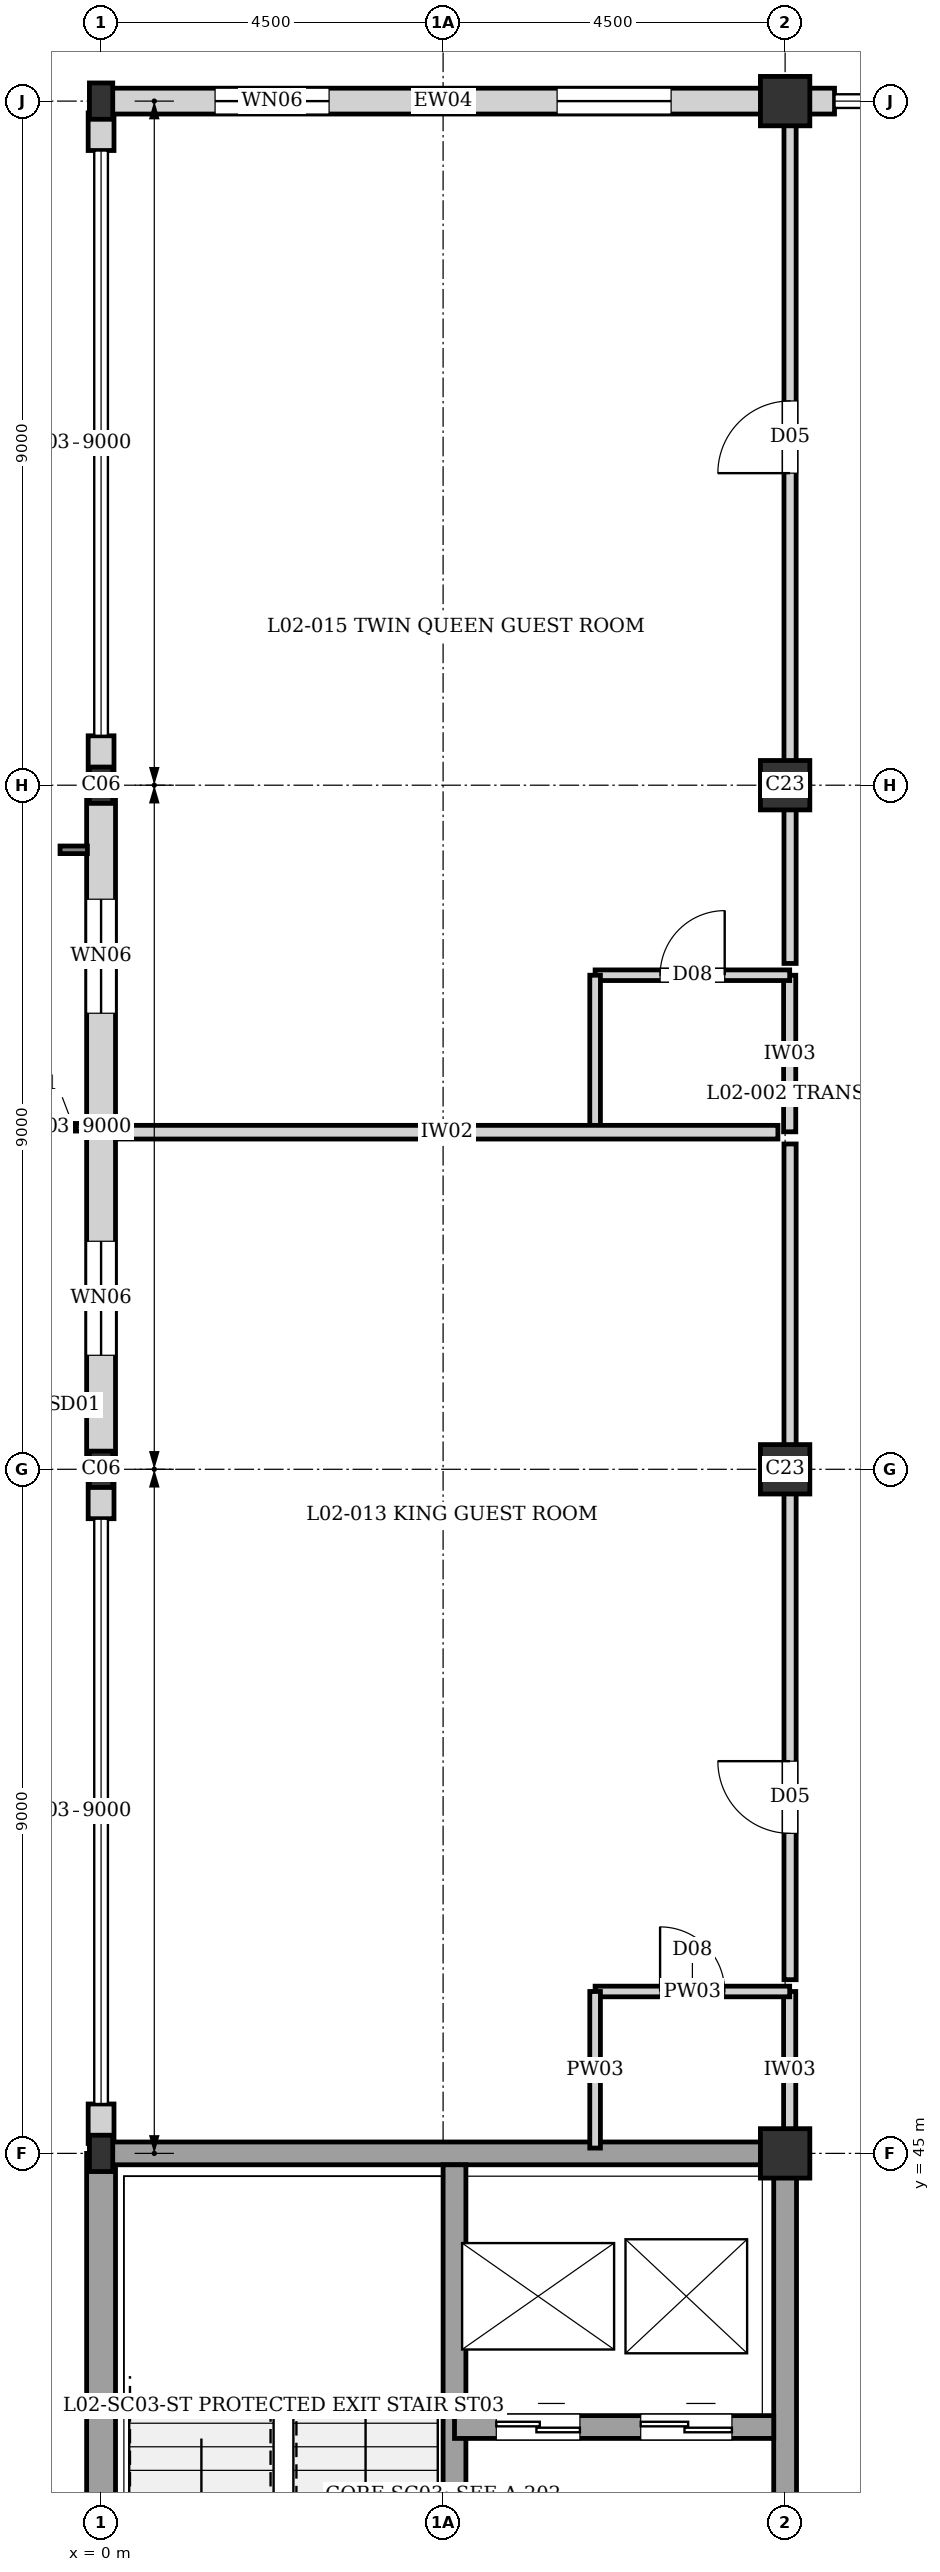
"""IFC4 building model, lengths in metres.
Left out: names, types, materials, properties, quantities, classifications, styles, units other than length and angle.
Written with IfcOpenShell. Run it as: python <this file> out.ifc"""

import sys

from ifc_helpers import new_model, si_unit, direction, frame, frame_2d, origin, origin_2d, place, context, subcontext, project, spatial, rectangle, i_section, extrude, element, fill, save


model = new_model("IFC4")
c1 = context("Model", 3, precision=1e-05, world=origin(), true_north=direction((0.0, 1.0)))
c2 = subcontext(c1, "Body", "Model", "MODEL_VIEW")
j1 = project(units=[si_unit("LENGTHUNIT", "METRE"), si_unit("PLANEANGLEUNIT", "RADIAN")], contexts=[c1])
p1 = place(None, origin())
s1 = spatial("IfcSite", under=j1, at=p1, CompositionType="ELEMENT")
p2 = place(p1, origin())
s2 = spatial("IfcBuilding", under=s1, at=p2, CompositionType="ELEMENT")
p3 = place(p2, frame((0.0, 0.0, 8.16)))
s3 = spatial("IfcBuildingStorey", under=s2, at=p3, CompositionType="ELEMENT", Elevation=8.16)
for number, where, z_axis, x_axis in (
    (1, (0.0, 45.0, 0.0), (0.0, 0.0, 1.0), (1.0, 0.0, 0.0)),
    (2, (0.0, 54.0, 0.0), (0.0, 0.0, 1.0), (1.0, 0.0, 0.0)),
    (3, (0.0, 63.0, 0.0), (0.0, 0.0, 1.0), (1.0, 0.0, 0.0)),
    (4, (0.0, 72.0, 0.0), (0.0, 0.0, 1.0), (1.0, 0.0, 0.0)),
):
    element("IfcColumn", number, at=place(p3, frame(where, z_axis=z_axis, x_axis=x_axis)), inside=s3, PredefinedType="COLUMN", context=c2, shape_type="SweptSolid", body=[
        extrude(i_section(OverallWidth=0.307, OverallDepth=0.478, WebThickness=0.021, FlangeThickness=0.04, at=origin_2d()), origin(), (0.0, 0.0, 1.0), 3.36),
    ])
for number, where, z_axis, x_axis in (
    (5, (9.0, 45.0, 0.0), (0.0, 0.0, 1.0), (1.0, 0.0, 0.0)),
    (6, (9.0, 54.0, 0.0), (0.0, 0.0, 1.0), (1.0, 0.0, 0.0)),
    (7, (9.0, 63.0, 0.0), (0.0, 0.0, 1.0), (1.0, 0.0, 0.0)),
    (8, (9.0, 72.0, 0.0), (0.0, 0.0, 1.0), (1.0, 0.0, 0.0)),
):
    element("IfcColumn", number, at=place(p3, frame(where, z_axis=z_axis, x_axis=x_axis)), inside=s3, PredefinedType="COLUMN", context=c2, shape_type="SweptSolid", body=[
        extrude(rectangle(XDim=0.65, YDim=0.65, at=origin_2d()), origin(), (0.0, 0.0, 1.0), 3.36),
    ])
p4 = place(p3, frame((0.0, 36.0, 0.0), z_axis=(0.0, 0.0, 1.0), x_axis=(0.0, 1.0, 0.0)))
e9 = element("IfcWall", 9, at=p4, inside=s3, PredefinedType="SOLIDWALL", context=c2, shape_type="SweptSolid", body=[
    extrude(rectangle(XDim=9.0, YDim=0.38, at=frame_2d((4.5, 0.0))), origin(), (0.0, 0.0, 1.0), 3.14),
])
p5 = place(p3, frame((0.0, 45.13, 0.0), z_axis=(0.0, 0.0, 1.0), x_axis=(0.0, 1.0, 0.0)))
e10 = element("IfcWall", 10, at=p5, inside=s3, PredefinedType="SOLIDWALL", context=c2, shape_type="SweptSolid", body=[
    extrude(rectangle(XDim=0.52, YDim=0.34, at=frame_2d((0.26, 0.0))), origin(), (0.0, 0.0, 1.0), 2.74),
])
p6 = place(p3, frame((0.0, 53.35, 0.0), z_axis=(0.0, 0.0, 1.0), x_axis=(0.0, 1.0, 0.0)))
e11 = element("IfcWall", 11, at=p6, inside=s3, PredefinedType="SOLIDWALL", context=c2, shape_type="SweptSolid", body=[
    extrude(rectangle(XDim=0.65, YDim=0.34, at=frame_2d((0.325, 0.0))), origin(), (0.0, 0.0, 1.0), 2.74),
])
p7 = place(p3, frame((0.0, 54.0, 0.0), z_axis=(0.0, 0.0, 1.0), x_axis=(0.0, 1.0, 0.0)))
e12 = element("IfcWall", 12, at=p7, inside=s3, PredefinedType="SOLIDWALL", context=c2, shape_type="SweptSolid", body=[
    extrude(rectangle(XDim=9.0, YDim=0.38, at=frame_2d((4.5, 0.0))), origin(), (0.0, 0.0, 1.0), 2.7),
])
p8 = place(p7, frame((1.5, 0.0, 0.35)))
e13 = element("IfcOpeningElement", 13, at=p8, cuts=e12, PredefinedType="OPENING", context=c2, shape_type="SweptSolid", body=[
    extrude(rectangle(XDim=1.5, YDim=1.8, at=frame_2d((0.75, 0.9))), frame((0.0, 0.2, 0.0), z_axis=(0.0, -1.0, 0.0), x_axis=(1.0, 0.0, 0.0)), (0.0, 0.0, 1.0), 0.4),
])
p9 = place(p7, frame((6.0, 0.0, 0.35)))
e14 = element("IfcOpeningElement", 14, at=p9, cuts=e12, PredefinedType="OPENING", context=c2, shape_type="SweptSolid", body=[
    extrude(rectangle(XDim=1.5, YDim=1.8, at=frame_2d((0.75, 0.9))), frame((0.0, 0.2, 0.0), z_axis=(0.0, -1.0, 0.0), x_axis=(1.0, 0.0, 0.0)), (0.0, 0.0, 1.0), 0.4),
])
p10 = place(p3, frame((0.0, 63.0, 0.0), z_axis=(0.0, 0.0, 1.0), x_axis=(0.0, 1.0, 0.0)))
e15 = element("IfcWall", 15, at=p10, inside=s3, PredefinedType="SOLIDWALL", context=c2, shape_type="SweptSolid", body=[
    extrude(rectangle(XDim=0.65, YDim=0.34, at=frame_2d((0.325, 0.0))), origin(), (0.0, 0.0, 1.0), 3.14),
])
p11 = place(p3, frame((0.0, 71.35, 0.0), z_axis=(0.0, 0.0, 1.0), x_axis=(0.0, 1.0, 0.0)))
e16 = element("IfcWall", 16, at=p11, inside=s3, PredefinedType="SOLIDWALL", context=c2, shape_type="SweptSolid", body=[
    extrude(rectangle(XDim=0.495, YDim=0.34, at=frame_2d((0.248, 0.0))), origin(), (0.0, 0.0, 1.0), 3.14),
])
p12 = place(p3, frame((0.0, 72.0, 0.0), z_axis=(0.0, 0.0, 1.0), x_axis=(1.0, 0.0, 0.0)))
e17 = element("IfcWall", 17, at=p12, inside=s3, PredefinedType="SOLIDWALL", context=c2, shape_type="SweptSolid", body=[
    extrude(rectangle(XDim=9.0, YDim=0.34, at=frame_2d((4.5, 0.0))), origin(), (0.0, 0.0, 1.0), 2.87),
])
p13 = place(p12, frame((1.5, 0.0, 0.35)))
e18 = element("IfcOpeningElement", 18, at=p13, cuts=e17, PredefinedType="OPENING", context=c2, shape_type="SweptSolid", body=[
    extrude(rectangle(XDim=1.5, YDim=1.8, at=frame_2d((0.75, 0.9))), frame((0.0, 0.18, 0.0), z_axis=(0.0, -1.0, 0.0), x_axis=(1.0, 0.0, 0.0)), (0.0, 0.0, 1.0), 0.36),
])
p14 = place(p12, frame((6.0, 0.0, 0.35)))
e19 = element("IfcOpeningElement", 19, at=p14, cuts=e17, PredefinedType="OPENING", context=c2, shape_type="SweptSolid", body=[
    extrude(rectangle(XDim=1.5, YDim=1.8, at=frame_2d((0.75, 0.9))), frame((0.0, 0.18, 0.0), z_axis=(0.0, -1.0, 0.0), x_axis=(1.0, 0.0, 0.0)), (0.0, 0.0, 1.0), 0.36),
])
p15 = place(p3, frame((9.0, 72.0, 0.0), z_axis=(0.0, 0.0, 1.0), x_axis=(1.0, 0.0, 0.0)))
e20 = element("IfcWall", 20, at=p15, inside=s3, PredefinedType="SOLIDWALL", context=c2, shape_type="SweptSolid", body=[
    extrude(rectangle(XDim=0.65, YDim=0.34, at=frame_2d((0.325, 0.0))), origin(), (0.0, 0.0, 1.0), 2.8),
])
p16 = place(p3, frame((9.0, 36.0, 0.0), z_axis=(0.0, 0.0, 1.0), x_axis=(0.0, 1.0, 0.0)))
e21 = element("IfcWall", 21, at=p16, inside=s3, PredefinedType="SHEAR", context=c2, shape_type="SweptSolid", body=[
    extrude(rectangle(XDim=9.0, YDim=0.3, at=frame_2d((4.5, 0.0))), origin(), (0.0, 0.0, 1.0), 3.14),
])
p17 = place(p16, frame((1.95, 0.0, 0.0)))
e22 = element("IfcOpeningElement", 22, at=p17, cuts=e21, PredefinedType="OPENING", context=c2, shape_type="SweptSolid", body=[
    extrude(rectangle(XDim=1.6, YDim=2.1, at=frame_2d((0.8, 1.05))), frame((0.0, 0.16, 0.0), z_axis=(0.0, -1.0, 0.0), x_axis=(1.0, 0.0, 0.0)), (0.0, 0.0, 1.0), 0.32),
])
p18 = place(p3, frame((0.0, 45.0, 0.0), z_axis=(0.0, 0.0, 1.0), x_axis=(1.0, 0.0, 0.0)))
e23 = element("IfcWall", 23, at=p18, inside=s3, PredefinedType="SHEAR", context=c2, shape_type="SweptSolid", body=[
    extrude(rectangle(XDim=9.0, YDim=0.3, at=frame_2d((4.5, 0.0))), origin(), (0.0, 0.0, 1.0), 3.14),
])
p19 = place(p3, frame((4.65, 36.15, 0.0), z_axis=(0.0, 0.0, 1.0), x_axis=(0.0, 1.0, 0.0)))
e24 = element("IfcWall", 24, at=p19, inside=s3, PredefinedType="SHEAR", context=c2, shape_type="SweptSolid", body=[
    extrude(rectangle(XDim=8.7, YDim=0.3, at=frame_2d((4.35, 0.0))), origin(), (0.0, 0.0, 1.0), 3.14),
])
p20 = place(p19, frame((0.35, 0.0, 0.0)))
e25 = element("IfcOpeningElement", 25, at=p20, cuts=e24, PredefinedType="OPENING", context=c2, shape_type="SweptSolid", body=[
    extrude(rectangle(XDim=1.4, YDim=2.02, at=frame_2d((0.7, 1.01))), frame((0.0, 0.16, 0.0), z_axis=(0.0, -1.0, 0.0), x_axis=(1.0, 0.0, 0.0)), (0.0, 0.0, 1.0), 0.32),
])
p21 = place(p3, frame((4.65, 41.4, 0.0), z_axis=(0.0, 0.0, 1.0), x_axis=(1.0, 0.0, 0.0)))
e26 = element("IfcWall", 26, at=p21, inside=s3, PredefinedType="SHEAR", context=c2, shape_type="SweptSolid", body=[
    extrude(rectangle(XDim=4.2, YDim=0.3, at=frame_2d((2.1, 0.0))), origin(), (0.0, 0.0, 1.0), 3.14),
])
p22 = place(p21, frame((0.55, 0.0, 0.0)))
e27 = element("IfcOpeningElement", 27, at=p22, cuts=e26, PredefinedType="OPENING", context=c2, shape_type="SweptSolid", body=[
    extrude(rectangle(XDim=1.1, YDim=2.1, at=frame_2d((0.55, 1.05))), frame((0.0, 0.16, 0.0), z_axis=(0.0, -1.0, 0.0), x_axis=(1.0, 0.0, 0.0)), (0.0, 0.0, 1.0), 0.32),
])
p23 = place(p21, frame((2.45, 0.0, 0.0)))
e28 = element("IfcOpeningElement", 28, at=p23, cuts=e26, PredefinedType="OPENING", context=c2, shape_type="SweptSolid", body=[
    extrude(rectangle(XDim=1.2, YDim=2.2, at=frame_2d((0.6, 1.1))), frame((0.0, 0.16, 0.0), z_axis=(0.0, -1.0, 0.0), x_axis=(1.0, 0.0, 0.0)), (0.0, 0.0, 1.0), 0.32),
])
p24 = place(p3, frame((9.06, 45.07, 0.0), z_axis=(0.0, 0.0, 1.0), x_axis=(0.0, 1.0, 0.0)))
e29 = element("IfcWall", 29, at=p24, inside=s3, PredefinedType="PARTITIONING", context=c2, shape_type="SweptSolid", body=[
    extrude(rectangle(XDim=2.06, YDim=0.16, at=frame_2d((1.03, 0.0))), origin(), (0.0, 0.0, 1.0), 2.66),
])
p25 = place(p3, frame((6.5, 47.13, 0.0), z_axis=(0.0, 0.0, 1.0), x_axis=(1.0, 0.0, 0.0)))
e30 = element("IfcWall", 30, at=p25, inside=s3, PredefinedType="PLUMBINGWALL", context=c2, shape_type="SweptSolid", body=[
    extrude(rectangle(XDim=2.56, YDim=0.14, at=frame_2d((1.28, 0.0))), origin(), (0.0, 0.0, 1.0), 3.14),
])
p26 = place(p25, frame((0.855, 0.0, 0.0)))
e31 = element("IfcOpeningElement", 31, at=p26, cuts=e30, PredefinedType="OPENING", context=c2, shape_type="SweptSolid", body=[
    extrude(rectangle(XDim=0.85, YDim=2.04, at=frame_2d((0.425, 1.02))), frame((0.0, 0.08, 0.0), z_axis=(0.0, -1.0, 0.0), x_axis=(1.0, 0.0, 0.0)), (0.0, 0.0, 1.0), 0.16),
])
p27 = place(p3, frame((6.5, 45.07, 0.0), z_axis=(0.0, 0.0, 1.0), x_axis=(0.0, 1.0, 0.0)))
e32 = element("IfcWall", 32, at=p27, inside=s3, PredefinedType="PLUMBINGWALL", context=c2, shape_type="SweptSolid", body=[
    extrude(rectangle(XDim=2.06, YDim=0.14, at=frame_2d((1.03, 0.0))), origin(), (0.0, 0.0, 1.0), 3.14),
])
p28 = place(p3, frame((9.06, 58.44, 0.0), z_axis=(0.0, 0.0, 1.0), x_axis=(0.0, 1.0, 0.0)))
e33 = element("IfcWall", 33, at=p28, inside=s3, PredefinedType="PARTITIONING", context=c2, shape_type="SweptSolid", body=[
    extrude(rectangle(XDim=2.06, YDim=0.16, at=frame_2d((1.03, 0.0))), origin(), (0.0, 0.0, 1.0), 2.61),
])
p29 = place(p3, frame((6.5, 60.5, 0.0), z_axis=(0.0, 0.0, 1.0), x_axis=(1.0, 0.0, 0.0)))
e34 = element("IfcWall", 34, at=p29, inside=s3, PredefinedType="PLUMBINGWALL", context=c2, shape_type="SweptSolid", body=[
    extrude(rectangle(XDim=2.56, YDim=0.14, at=frame_2d((1.28, 0.0))), origin(), (0.0, 0.0, 1.0), 3.14),
])
p30 = place(p29, frame((0.855, 0.0, 0.0)))
e35 = element("IfcOpeningElement", 35, at=p30, cuts=e34, PredefinedType="OPENING", context=c2, shape_type="SweptSolid", body=[
    extrude(rectangle(XDim=0.85, YDim=2.04, at=frame_2d((0.425, 1.02))), frame((0.0, 0.08, 0.0), z_axis=(0.0, -1.0, 0.0), x_axis=(1.0, 0.0, 0.0)), (0.0, 0.0, 1.0), 0.16),
])
p31 = place(p3, frame((6.5, 58.44, 0.0), z_axis=(0.0, 0.0, 1.0), x_axis=(0.0, 1.0, 0.0)))
e36 = element("IfcWall", 36, at=p31, inside=s3, PredefinedType="PLUMBINGWALL", context=c2, shape_type="SweptSolid", body=[
    extrude(rectangle(XDim=2.06, YDim=0.14, at=frame_2d((1.03, 0.0))), origin(), (0.0, 0.0, 1.0), 3.14),
])
p32 = place(p3, frame((0.195, 58.435, 0.0), z_axis=(0.0, 0.0, 1.0), x_axis=(1.0, 0.0, 0.0)))
e37 = element("IfcWall", 37, at=p32, inside=s3, PredefinedType="PARTITIONING", context=c2, shape_type="SweptSolid", body=[
    extrude(rectangle(XDim=8.71, YDim=0.18, at=frame_2d((4.355, 0.0))), origin(), (0.0, 0.0, 1.0), 3.14),
])
p33 = place(p3, frame((9.065, 47.285, 0.0), z_axis=(0.0, 0.0, 1.0), x_axis=(0.0, 1.0, 0.0)))
e38 = element("IfcWall", 38, at=p33, inside=s3, PredefinedType="PARTITIONING", context=c2, shape_type="SweptSolid", body=[
    extrude(rectangle(XDim=6.695, YDim=0.16, at=frame_2d((3.348, 0.0))), origin(), (0.0, 0.0, 1.0), 2.66),
])
p34 = place(p33, frame((1.925, 0.0, 0.0)))
e39 = element("IfcOpeningElement", 39, at=p34, cuts=e38, PredefinedType="OPENING", context=c2, shape_type="SweptSolid", body=[
    extrude(rectangle(XDim=0.95, YDim=2.15, at=frame_2d((0.475, 1.075))), frame((0.0, 0.09, 0.0), z_axis=(0.0, -1.0, 0.0), x_axis=(1.0, 0.0, 0.0)), (0.0, 0.0, 1.0), 0.18),
])
p35 = place(p3, frame((9.065, 60.655, 0.0), z_axis=(0.0, 0.0, 1.0), x_axis=(0.0, 1.0, 0.0)))
e40 = element("IfcWall", 40, at=p35, inside=s3, PredefinedType="PARTITIONING", context=c2, shape_type="SweptSolid", body=[
    extrude(rectangle(XDim=2.325, YDim=0.16, at=frame_2d((1.163, 0.0))), origin(), (0.0, 0.0, 1.0), 2.61),
])
p36 = place(p3, frame((9.065, 53.98, 0.0), z_axis=(0.0, 0.0, 1.0), x_axis=(0.0, 1.0, 0.0)))
e41 = element("IfcWall", 41, at=p36, inside=s3, PredefinedType="PARTITIONING", context=c2, shape_type="SweptSolid", body=[
    extrude(rectangle(XDim=4.3, YDim=0.16, at=frame_2d((2.15, 0.0))), origin(), (0.0, 0.0, 1.0), 2.61),
])
p37 = place(p3, frame((9.065, 62.98, 0.0), z_axis=(0.0, 0.0, 1.0), x_axis=(0.0, 1.0, 0.0)))
e42 = element("IfcWall", 42, at=p37, inside=s3, PredefinedType="PARTITIONING", context=c2, shape_type="SweptSolid", body=[
    extrude(rectangle(XDim=8.845, YDim=0.16, at=frame_2d((4.422, 0.0))), origin(), (0.0, 0.0, 1.0), 2.51),
])
p38 = place(p37, frame((4.125, 0.0, 0.0)))
e43 = element("IfcOpeningElement", 43, at=p38, cuts=e42, PredefinedType="OPENING", context=c2, shape_type="SweptSolid", body=[
    extrude(rectangle(XDim=0.95, YDim=2.15, at=frame_2d((0.475, 1.075))), frame((0.0, 0.09, 0.0), z_axis=(0.0, -1.0, 0.0), x_axis=(1.0, 0.0, 0.0)), (0.0, 0.0, 1.0), 0.18),
])
p39 = place(p8, origin())
e44 = element("IfcWindow", 44, at=p39, inside=s3, PartitioningType="SINGLE_PANEL", PredefinedType="WINDOW", context=c2, shape_type="SweptSolid", body=[
    extrude(rectangle(XDim=1.5, YDim=1.8, at=frame_2d((0.75, 0.9))), frame((0.0, 0.03, 0.0), z_axis=(0.0, -1.0, 0.0), x_axis=(1.0, 0.0, 0.0)), (0.0, 0.0, 1.0), 0.06),
])
fill(e13, e44)
p40 = place(p9, origin())
e45 = element("IfcWindow", 45, at=p40, inside=s3, PartitioningType="SINGLE_PANEL", PredefinedType="WINDOW", context=c2, shape_type="SweptSolid", body=[
    extrude(rectangle(XDim=1.5, YDim=1.8, at=frame_2d((0.75, 0.9))), frame((0.0, 0.03, 0.0), z_axis=(0.0, -1.0, 0.0), x_axis=(1.0, 0.0, 0.0)), (0.0, 0.0, 1.0), 0.06),
])
fill(e14, e45)
p41 = place(p13, origin())
e46 = element("IfcWindow", 46, at=p41, inside=s3, PartitioningType="SINGLE_PANEL", PredefinedType="WINDOW", context=c2, shape_type="SweptSolid", body=[
    extrude(rectangle(XDim=1.5, YDim=1.8, at=frame_2d((0.75, 0.9))), frame((0.0, 0.03, 0.0), z_axis=(0.0, -1.0, 0.0), x_axis=(1.0, 0.0, 0.0)), (0.0, 0.0, 1.0), 0.06),
])
fill(e18, e46)
p42 = place(p14, origin())
e47 = element("IfcWindow", 47, at=p42, inside=s3, PartitioningType="SINGLE_PANEL", PredefinedType="WINDOW", context=c2, shape_type="SweptSolid", body=[
    extrude(rectangle(XDim=1.5, YDim=1.8, at=frame_2d((0.75, 0.9))), frame((0.0, 0.03, 0.0), z_axis=(0.0, -1.0, 0.0), x_axis=(1.0, 0.0, 0.0)), (0.0, 0.0, 1.0), 0.06),
])
fill(e19, e47)
p43 = place(p22, origin())
e48 = element("IfcDoor", 48, at=p43, inside=s3, OperationType="DOUBLE_DOOR_SLIDING", PredefinedType="DOOR", context=c2, shape_type="SweptSolid", body=[
    extrude(rectangle(XDim=1.1, YDim=2.1, at=frame_2d((0.55, 1.05))), frame((0.0, 0.025, 0.0), z_axis=(0.0, -1.0, 0.0), x_axis=(1.0, 0.0, 0.0)), (0.0, 0.0, 1.0), 0.05),
])
fill(e27, e48)
p44 = place(p23, origin())
e49 = element("IfcDoor", 49, at=p44, inside=s3, OperationType="DOUBLE_DOOR_SLIDING", PredefinedType="DOOR", context=c2, shape_type="SweptSolid", body=[
    extrude(rectangle(XDim=1.2, YDim=2.2, at=frame_2d((0.6, 1.1))), frame((0.0, 0.025, 0.0), z_axis=(0.0, -1.0, 0.0), x_axis=(1.0, 0.0, 0.0)), (0.0, 0.0, 1.0), 0.05),
])
fill(e28, e49)
p45 = place(p26, origin())
e50 = element("IfcDoor", 50, at=p45, inside=s3, OperationType="SINGLE_SWING_LEFT", PredefinedType="DOOR", context=c2, shape_type="SweptSolid", body=[
    extrude(rectangle(XDim=0.85, YDim=2.04, at=frame_2d((0.425, 1.02))), frame((0.0, 0.025, 0.0), z_axis=(0.0, -1.0, 0.0), x_axis=(1.0, 0.0, 0.0)), (0.0, 0.0, 1.0), 0.05),
])
fill(e31, e50)
p46 = place(p30, origin())
e51 = element("IfcDoor", 51, at=p46, inside=s3, OperationType="SINGLE_SWING_RIGHT", PredefinedType="DOOR", context=c2, shape_type="SweptSolid", body=[
    extrude(rectangle(XDim=0.85, YDim=2.04, at=frame_2d((0.425, 1.02))), frame((0.0, 0.025, 0.0), z_axis=(0.0, -1.0, 0.0), x_axis=(1.0, 0.0, 0.0)), (0.0, 0.0, 1.0), 0.05),
])
fill(e35, e51)
p47 = place(p34, origin())
e52 = element("IfcDoor", 52, at=p47, inside=s3, OperationType="SINGLE_SWING_RIGHT", PredefinedType="DOOR", context=c2, shape_type="SweptSolid", body=[
    extrude(rectangle(XDim=0.95, YDim=2.15, at=frame_2d((0.475, 1.075))), frame((0.0, 0.025, 0.0), z_axis=(0.0, -1.0, 0.0), x_axis=(1.0, 0.0, 0.0)), (0.0, 0.0, 1.0), 0.05),
])
fill(e39, e52)
p48 = place(p38, origin())
e53 = element("IfcDoor", 53, at=p48, inside=s3, OperationType="SINGLE_SWING_LEFT", PredefinedType="DOOR", context=c2, shape_type="SweptSolid", body=[
    extrude(rectangle(XDim=0.95, YDim=2.15, at=frame_2d((0.475, 1.075))), frame((0.0, 0.025, 0.0), z_axis=(0.0, -1.0, 0.0), x_axis=(1.0, 0.0, 0.0)), (0.0, 0.0, 1.0), 0.05),
])
fill(e43, e53)
save(model, sys.argv[1])
